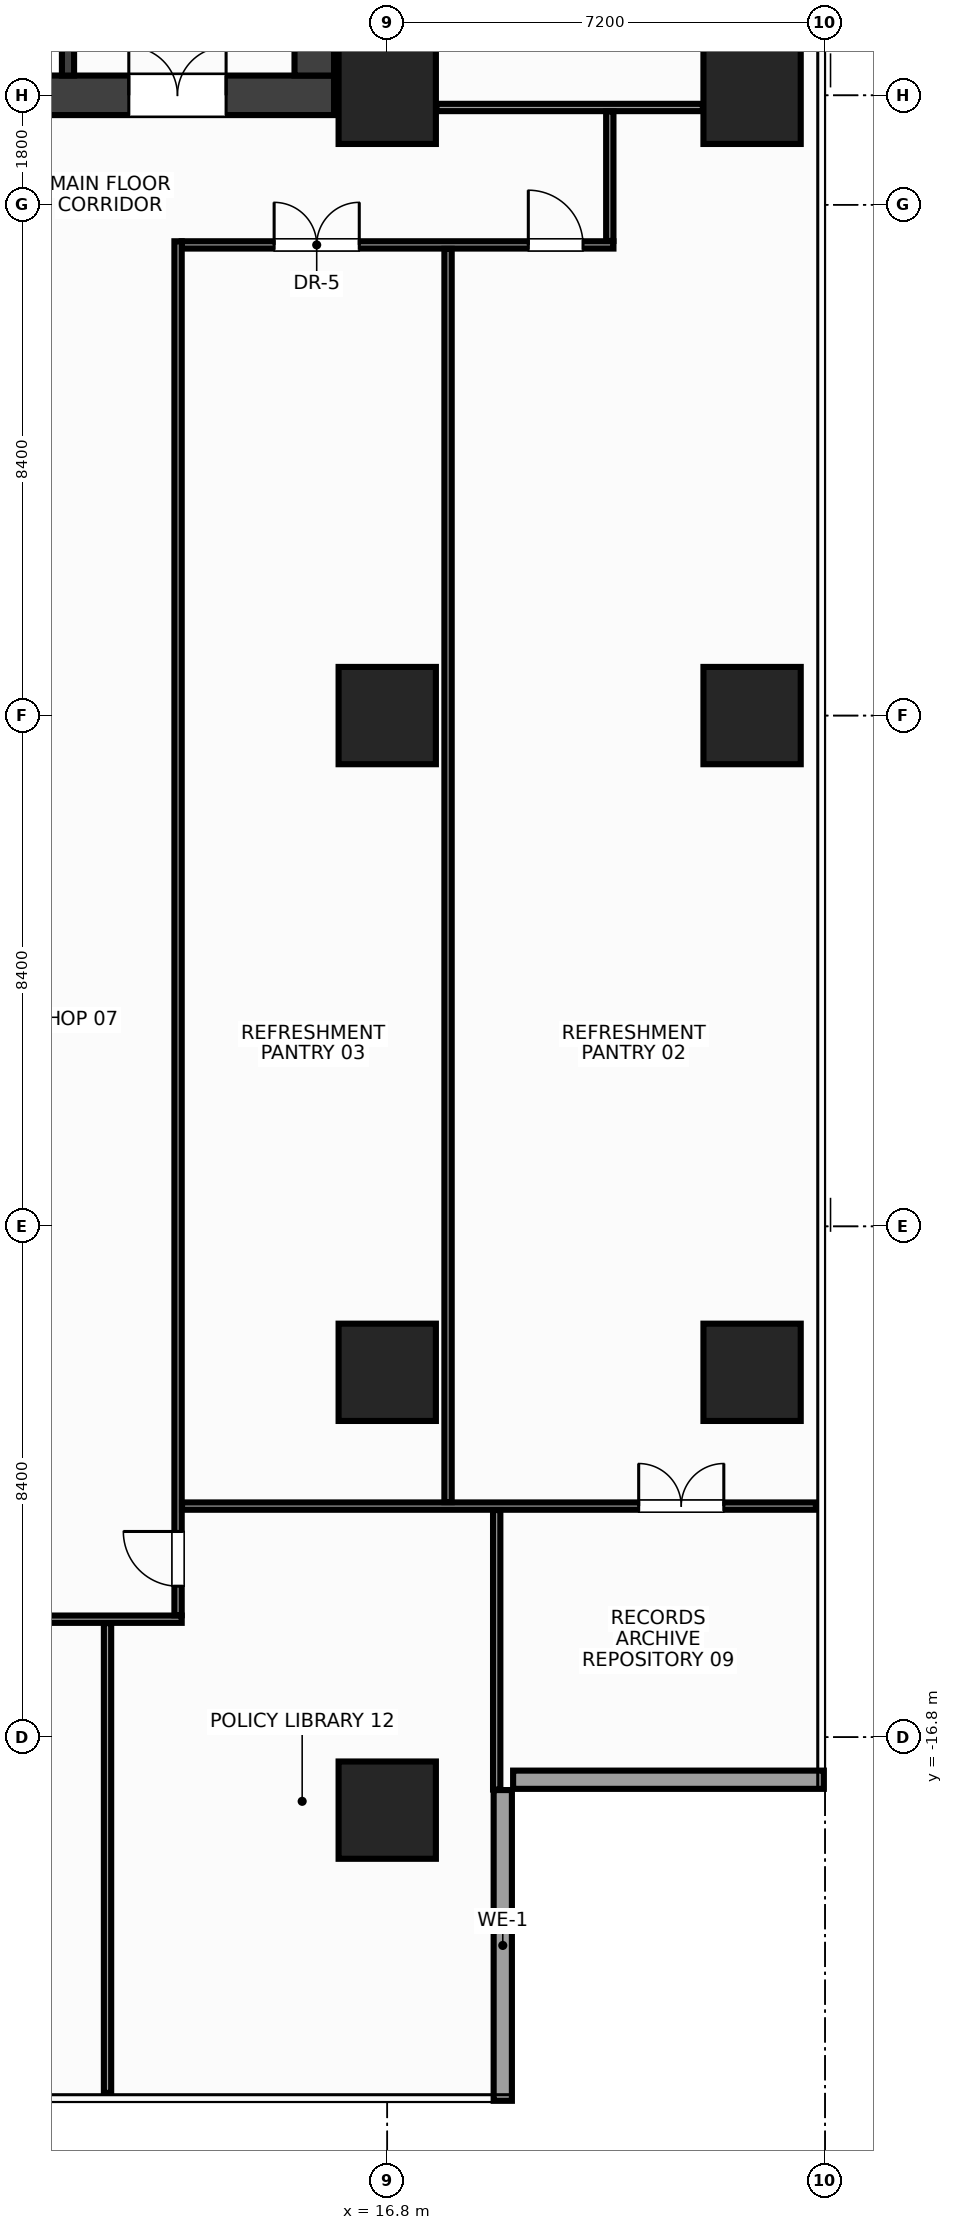
"""IFC4 building model, lengths in metres.
Left out: names, types, materials, properties, quantities, classifications, styles, units other than length and angle.
Written with IfcOpenShell. Run it as: python <this file> out.ifc"""

import sys

from ifc_helpers import new_model, si_unit, direction, frame, frame_2d, origin, origin_2d, place, context, subcontext, project, spatial, rectangle, extrude, source, transform, mapped, element, fill, save


model = new_model("IFC4")
c1 = context("Model", 3, precision=1e-05, world=origin(), true_north=direction((0.0, 1.0)))
c2 = subcontext(c1, "Body", "Model", "MODEL_VIEW")
j1 = project(units=[si_unit("LENGTHUNIT", "METRE"), si_unit("PLANEANGLEUNIT", "RADIAN")], contexts=[c1])
p1 = place(None, origin())
s1 = spatial("IfcSite", under=j1, at=p1, CompositionType="ELEMENT")
p2 = place(p1, origin())
s2 = spatial("IfcBuilding", under=s1, at=p2, CompositionType="ELEMENT")
p3 = place(p2, frame((0.0, 0.0, 182.0)))
s3 = spatial("IfcBuildingStorey", under=s2, at=p3, CompositionType="ELEMENT", Elevation=182.0)
m1 = source(origin(), c2, "Body", "SweptSolid", [
    extrude(rectangle(XDim=31.85, YDim=0.65, at=frame_2d((15.925, 0.0))), origin(), (0.0, 0.0, 1.0), 3.6),
])
p4 = place(p3, frame((-15.925, 10.2, 0.0), z_axis=(0.0, 0.0, 1.0), x_axis=(1.0, 0.0, 0.0)))
e1 = element("IfcWall", 1, at=p4, inside=s3, PredefinedType="SHEAR", context=c2, shape_type="MappedRepresentation", body=[
    mapped(m1, transform((0.0, 0.0, 0.0), x_axis=(1.0, 0.0, 0.0), y_axis=(0.0, 1.0, 0.0), z_axis=(0.0, 0.0, 1.0), scale=1.0)),
])
p5 = place(p4, frame((1.775, 0.0, 0.0)))
e2 = element("IfcOpeningElement", 2, at=p5, cuts=e1, PredefinedType="OPENING", context=c2, shape_type="SweptSolid", body=[
    extrude(rectangle(XDim=1.6, YDim=2.15, at=frame_2d((0.8, 1.075))), frame((0.0, 0.337, 0.0), z_axis=(0.0, -1.0, 0.0), x_axis=(1.0, 0.0, 0.0)), (0.0, 0.0, 1.0), 0.674),
])
p6 = place(p4, frame((28.475, 0.0, 0.0)))
e3 = element("IfcOpeningElement", 3, at=p6, cuts=e1, PredefinedType="OPENING", context=c2, shape_type="SweptSolid", body=[
    extrude(rectangle(XDim=1.6, YDim=2.15, at=frame_2d((0.8, 1.075))), frame((0.0, 0.337, 0.0), z_axis=(0.0, -1.0, 0.0), x_axis=(1.0, 0.0, 0.0)), (0.0, 0.0, 1.0), 0.674),
])
p7 = place(p4, frame((15.175, 0.0, 0.0)))
e4 = element("IfcOpeningElement", 4, at=p7, cuts=e1, PredefinedType="OPENING", context=c2, shape_type="SweptSolid", body=[
    extrude(rectangle(XDim=1.5, YDim=2.2, at=frame_2d((0.75, 1.1))), frame((0.0, 0.337, 0.0), z_axis=(0.0, -1.0, 0.0), x_axis=(1.0, 0.0, 0.0)), (0.0, 0.0, 1.0), 0.674),
])
m2 = source(origin(), c2, "Body", "SweptSolid", [
    extrude(rectangle(XDim=12.95, YDim=0.65, at=frame_2d((6.475, 0.0))), origin(), (0.0, 0.0, 1.0), 3.6),
])
p8 = place(p3, frame((15.6, 10.525, 0.0), z_axis=(0.0, 0.0, 1.0), x_axis=(0.0, 1.0, 0.0)))
e5 = element("IfcWall", 5, at=p8, inside=s3, PredefinedType="SHEAR", context=c2, shape_type="MappedRepresentation", body=[
    mapped(m2, transform((0.0, 0.0, 0.0), x_axis=(1.0, 0.0, 0.0), y_axis=(0.0, 1.0, 0.0), z_axis=(0.0, 0.0, 1.0), scale=1.0)),
])
m3 = source(origin(), c2, "Body", "SweptSolid", [
    extrude(rectangle(XDim=3.125, YDim=0.2, at=frame_2d((1.562, 0.0))), origin(), (0.0, 0.0, 1.0), 3.6),
])
p9 = place(p3, frame((11.55, 10.525, 0.0), z_axis=(0.0, 0.0, 1.0), x_axis=(0.0, 1.0, 0.0)))
e6 = element("IfcWall", 6, at=p9, inside=s3, PredefinedType="SHEAR", context=c2, shape_type="MappedRepresentation", body=[
    mapped(m3, transform((0.0, 0.0, 0.0), x_axis=(1.0, 0.0, 0.0), y_axis=(0.0, 1.0, 0.0), z_axis=(0.0, 0.0, 1.0), scale=1.0)),
])
p10 = place(p9, frame((0.9, 0.0, 0.0)))
e7 = element("IfcOpeningElement", 7, at=p10, cuts=e6, PredefinedType="OPENING", context=c2, shape_type="SweptSolid", body=[
    extrude(rectangle(XDim=1.1, YDim=2.15, at=frame_2d((0.55, 1.075))), frame((0.0, 0.112, 0.0), z_axis=(0.0, -1.0, 0.0), x_axis=(1.0, 0.0, 0.0)), (0.0, 0.0, 1.0), 0.224),
])
m4 = source(origin(), c2, "Body", "SweptSolid", [
    extrude(rectangle(XDim=1.6, YDim=1.6, at=origin_2d()), origin(), (0.0, 0.0, 1.0), 3.6),
])
for number, where, z_axis, x_axis in (
    (8, (16.8, -18.0, 0.0), (0.0, 0.0, 1.0), (1.0, 0.0, 0.0)),
    (9, (16.8, -10.8, 0.0), (0.0, 0.0, 1.0), (1.0, 0.0, 0.0)),
    (10, (16.8, 0.0, 0.0), (0.0, 0.0, 1.0), (1.0, 0.0, 0.0)),
    (11, (16.8, 10.2, 0.0), (0.0, 0.0, 1.0), (1.0, 0.0, 0.0)),
    (12, (22.8, -10.8, 0.0), (0.0, 0.0, 1.0), (1.0, 0.0, 0.0)),
    (13, (22.8, 0.0, 0.0), (0.0, 0.0, 1.0), (1.0, 0.0, 0.0)),
    (14, (22.8, 10.2, 0.0), (0.0, 0.0, 1.0), (1.0, 0.0, 0.0)),
):
    element("IfcColumn", number, at=place(p3, frame(where, z_axis=z_axis, x_axis=x_axis)), inside=s3, PredefinedType="COLUMN", context=c2, shape_type="MappedRepresentation", body=[
        mapped(m4, transform((0.0, 0.0, 0.0), x_axis=(1.0, 0.0, 0.0), y_axis=(0.0, 1.0, 0.0), z_axis=(0.0, 0.0, 1.0), scale=1.0)),
    ])
m5 = source(origin(), c2, "Body", "SweptSolid", [
    extrude(rectangle(XDim=5.11, YDim=0.3, at=frame_2d((2.555, 0.0))), origin(), (0.0, 0.0, 1.0), 2.76),
])
p11 = place(p3, frame((18.7, -22.78, 0.0), z_axis=(0.0, 0.0, 1.0), x_axis=(0.0, 1.0, 0.0)))
e15 = element("IfcWall", 15, at=p11, inside=s3, PredefinedType="STANDARD", context=c2, shape_type="MappedRepresentation", body=[
    mapped(m5, transform((0.0, 0.0, 0.0), x_axis=(1.0, 0.0, 0.0), y_axis=(0.0, 1.0, 0.0), z_axis=(0.0, 0.0, 1.0), scale=1.0)),
])
m6 = source(origin(), c2, "Body", "SweptSolid", [
    extrude(rectangle(XDim=5.11, YDim=0.3, at=frame_2d((2.555, 0.0))), origin(), (0.0, 0.0, 1.0), 2.76),
])
p12 = place(p3, frame((18.87, -17.5, 0.0), z_axis=(0.0, 0.0, 1.0), x_axis=(1.0, 0.0, 0.0)))
e16 = element("IfcWall", 16, at=p12, inside=s3, PredefinedType="STANDARD", context=c2, shape_type="MappedRepresentation", body=[
    mapped(m6, transform((0.0, 0.0, 0.0), x_axis=(1.0, 0.0, 0.0), y_axis=(0.0, 1.0, 0.0), z_axis=(0.0, 0.0, 1.0), scale=1.0)),
])
m7 = source(origin(), c2, "Body", "SweptSolid", [
    extrude(rectangle(XDim=4.38, YDim=0.12, at=frame_2d((2.19, 0.0))), origin(), (0.0, 0.0, 1.0), 2.915),
])
p13 = place(p3, frame((17.61, 10.0, 0.0), z_axis=(0.0, 0.0, 1.0), x_axis=(1.0, 0.0, 0.0)))
e17 = element("IfcWall", 17, at=p13, inside=s3, PredefinedType="PARTITIONING", context=c2, shape_type="MappedRepresentation", body=[
    mapped(m7, transform((0.0, 0.0, 0.0), x_axis=(1.0, 0.0, 0.0), y_axis=(0.0, 1.0, 0.0), z_axis=(0.0, 0.0, 1.0), scale=1.0)),
])
m8 = source(origin(), c2, "Body", "SweptSolid", [
    extrude(rectangle(XDim=7.1, YDim=0.12, at=frame_2d((3.55, 0.0))), origin(), (0.0, 0.0, 1.0), 2.765),
])
p14 = place(p3, frame((13.42, 7.74, 0.0), z_axis=(0.0, 0.0, 1.0), x_axis=(1.0, 0.0, 0.0)))
e18 = element("IfcWall", 18, at=p14, inside=s3, PredefinedType="PARTITIONING", context=c2, shape_type="MappedRepresentation", body=[
    mapped(m8, transform((0.0, 0.0, 0.0), x_axis=(1.0, 0.0, 0.0), y_axis=(0.0, 1.0, 0.0), z_axis=(0.0, 0.0, 1.0), scale=1.0)),
])
p15 = place(p14, frame((5.7, 0.0, 0.0)))
e19 = element("IfcOpeningElement", 19, at=p15, cuts=e18, PredefinedType="OPENING", context=c2, shape_type="SweptSolid", body=[
    extrude(rectangle(XDim=0.9, YDim=2.15, at=frame_2d((0.45, 1.075))), frame((0.0, 0.072, 0.0), z_axis=(0.0, -1.0, 0.0), x_axis=(1.0, 0.0, 0.0)), (0.0, 0.0, 1.0), 0.144),
])
p16 = place(p14, frame((1.52, 0.0, 0.0)))
e20 = element("IfcOpeningElement", 20, at=p16, cuts=e18, PredefinedType="OPENING", context=c2, shape_type="SweptSolid", body=[
    extrude(rectangle(XDim=1.4, YDim=2.2, at=frame_2d((0.7, 1.1))), frame((0.0, 0.072, 0.0), z_axis=(0.0, -1.0, 0.0), x_axis=(1.0, 0.0, 0.0)), (0.0, 0.0, 1.0), 0.144),
])
m9 = source(origin(), c2, "Body", "SweptSolid", [
    extrude(rectangle(XDim=2.34, YDim=0.12, at=frame_2d((1.17, 0.0))), origin(), (0.0, 0.0, 1.0), 3.38),
])
p17 = place(p3, frame((11.08, -14.86, 0.0), z_axis=(0.0, 0.0, 1.0), x_axis=(1.0, 0.0, 0.0)))
e21 = element("IfcWall", 21, at=p17, inside=s3, PredefinedType="PARTITIONING", context=c2, shape_type="MappedRepresentation", body=[
    mapped(m9, transform((0.0, 0.0, 0.0), x_axis=(1.0, 0.0, 0.0), y_axis=(0.0, 1.0, 0.0), z_axis=(0.0, 0.0, 1.0), scale=1.0)),
])
m10 = source(origin(), c2, "Body", "SweptSolid", [
    extrude(rectangle(XDim=2.13, YDim=0.12, at=frame_2d((1.065, 0.0))), origin(), (0.0, 0.0, 1.0), 3.38),
])
p18 = place(p3, frame((20.46, 7.805, 0.0), z_axis=(0.0, 0.0, 1.0), x_axis=(0.0, 1.0, 0.0)))
e22 = element("IfcWall", 22, at=p18, inside=s3, PredefinedType="PARTITIONING", context=c2, shape_type="MappedRepresentation", body=[
    mapped(m10, transform((0.0, 0.0, 0.0), x_axis=(1.0, 0.0, 0.0), y_axis=(0.0, 1.0, 0.0), z_axis=(0.0, 0.0, 1.0), scale=1.0)),
])
m11 = source(origin(), c2, "Body", "SweptSolid", [
    extrude(rectangle(XDim=22.595, YDim=0.12, at=frame_2d((11.297, 0.0))), origin(), (0.0, 0.0, 1.0), 2.665),
])
p19 = place(p3, frame((13.36, -14.795, 0.0), z_axis=(0.0, 0.0, 1.0), x_axis=(0.0, 1.0, 0.0)))
e23 = element("IfcWall", 23, at=p19, inside=s3, PredefinedType="PARTITIONING", context=c2, shape_type="MappedRepresentation", body=[
    mapped(m11, transform((0.0, 0.0, 0.0), x_axis=(1.0, 0.0, 0.0), y_axis=(0.0, 1.0, 0.0), z_axis=(0.0, 0.0, 1.0), scale=1.0)),
])
p20 = place(p19, frame((0.478, 0.0, 0.0)))
e24 = element("IfcOpeningElement", 24, at=p20, cuts=e23, PredefinedType="OPENING", context=c2, shape_type="SweptSolid", body=[
    extrude(rectangle(XDim=0.9, YDim=2.15, at=frame_2d((0.45, 1.075))), frame((0.0, 0.072, 0.0), z_axis=(0.0, -1.0, 0.0), x_axis=(1.0, 0.0, 0.0)), (0.0, 0.0, 1.0), 0.144),
])
m12 = source(origin(), c2, "Body", "SweptSolid", [
    extrude(rectangle(XDim=10.425, YDim=0.12, at=frame_2d((5.212, 0.0))), origin(), (0.0, 0.0, 1.0), 2.965),
])
p21 = place(p3, frame((13.425, -13.0, 0.0), z_axis=(0.0, 0.0, 1.0), x_axis=(1.0, 0.0, 0.0)))
e25 = element("IfcWall", 25, at=p21, inside=s3, PredefinedType="PARTITIONING", context=c2, shape_type="MappedRepresentation", body=[
    mapped(m12, transform((0.0, 0.0, 0.0), x_axis=(1.0, 0.0, 0.0), y_axis=(0.0, 1.0, 0.0), z_axis=(0.0, 0.0, 1.0), scale=1.0)),
])
p22 = place(p21, frame((7.51, 0.0, 0.0)))
e26 = element("IfcOpeningElement", 26, at=p22, cuts=e25, PredefinedType="OPENING", context=c2, shape_type="SweptSolid", body=[
    extrude(rectangle(XDim=1.4, YDim=2.2, at=frame_2d((0.7, 1.1))), frame((0.0, 0.072, 0.0), z_axis=(0.0, -1.0, 0.0), x_axis=(1.0, 0.0, 0.0)), (0.0, 0.0, 1.0), 0.144),
])
m13 = source(origin(), c2, "Body", "SweptSolid", [
    extrude(rectangle(XDim=20.61, YDim=0.12, at=frame_2d((10.305, 0.0))), origin(), (0.0, 0.0, 1.0), 2.915),
])
p23 = place(p3, frame((17.8, -12.935, 0.0), z_axis=(0.0, 0.0, 1.0), x_axis=(0.0, 1.0, 0.0)))
e27 = element("IfcWall", 27, at=p23, inside=s3, PredefinedType="PARTITIONING", context=c2, shape_type="MappedRepresentation", body=[
    mapped(m13, transform((0.0, 0.0, 0.0), x_axis=(1.0, 0.0, 0.0), y_axis=(0.0, 1.0, 0.0), z_axis=(0.0, 0.0, 1.0), scale=1.0)),
])
m14 = source(origin(), c2, "Body", "SweptSolid", [
    extrude(rectangle(XDim=7.725, YDim=0.12, at=frame_2d((3.862, 0.0))), origin(), (0.0, 0.0, 1.0), 2.915),
])
p24 = place(p3, frame((12.2, -22.65, 0.0), z_axis=(0.0, 0.0, 1.0), x_axis=(0.0, 1.0, 0.0)))
e28 = element("IfcWall", 28, at=p24, inside=s3, PredefinedType="PARTITIONING", context=c2, shape_type="MappedRepresentation", body=[
    mapped(m14, transform((0.0, 0.0, 0.0), x_axis=(1.0, 0.0, 0.0), y_axis=(0.0, 1.0, 0.0), z_axis=(0.0, 0.0, 1.0), scale=1.0)),
])
m15 = source(origin(), c2, "Body", "SweptSolid", [
    extrude(rectangle(XDim=4.597, YDim=0.12, at=frame_2d((2.299, 0.0))), origin(), (0.0, 0.0, 1.0), 3.38),
])
p25 = place(p3, frame((18.6, -17.662, 0.0), z_axis=(0.0, 0.0, 1.0), x_axis=(0.0, 1.0, 0.0)))
e29 = element("IfcWall", 29, at=p25, inside=s3, PredefinedType="PARTITIONING", context=c2, shape_type="MappedRepresentation", body=[
    mapped(m15, transform((0.0, 0.0, 0.0), x_axis=(1.0, 0.0, 0.0), y_axis=(0.0, 1.0, 0.0), z_axis=(0.0, 0.0, 1.0), scale=1.0)),
])
m16 = source(origin(), c2, "Body", "SweptSolid", [
    extrude(rectangle(XDim=1.6, YDim=2.15, at=frame_2d((0.8, 1.075))), frame((0.0, 0.025, 0.0), z_axis=(0.0, -1.0, 0.0), x_axis=(1.0, 0.0, 0.0)), (0.0, 0.0, 1.0), 0.05),
])
p26 = place(p6, origin())
e30 = element("IfcDoor", 30, at=p26, inside=s3, OperationType="DOUBLE_DOOR_SINGLE_SWING", PredefinedType="DOOR", context=c2, shape_type="MappedRepresentation", body=[
    mapped(m16, transform((0.0, 0.0, 0.0), x_axis=(1.0, 0.0, 0.0), y_axis=(0.0, 1.0, 0.0), z_axis=(0.0, 0.0, 1.0), scale=1.0)),
])
fill(e3, e30)
m17 = source(origin(), c2, "Body", "SweptSolid", [
    extrude(rectangle(XDim=0.9, YDim=2.15, at=frame_2d((0.45, 1.075))), frame((0.0, 0.025, 0.0), z_axis=(0.0, -1.0, 0.0), x_axis=(1.0, 0.0, 0.0)), (0.0, 0.0, 1.0), 0.05),
])
p27 = place(p15, origin())
e31 = element("IfcDoor", 31, at=p27, inside=s3, OperationType="SINGLE_SWING_LEFT", PredefinedType="DOOR", context=c2, shape_type="MappedRepresentation", body=[
    mapped(m17, transform((0.0, 0.0, 0.0), x_axis=(1.0, 0.0, 0.0), y_axis=(0.0, 1.0, 0.0), z_axis=(0.0, 0.0, 1.0), scale=1.0)),
])
fill(e19, e31)
m18 = source(origin(), c2, "Body", "SweptSolid", [
    extrude(rectangle(XDim=1.4, YDim=2.2, at=frame_2d((0.7, 1.1))), frame((0.0, 0.025, 0.0), z_axis=(0.0, -1.0, 0.0), x_axis=(1.0, 0.0, 0.0)), (0.0, 0.0, 1.0), 0.05),
])
p28 = place(p16, origin())
e32 = element("IfcDoor", 32, at=p28, inside=s3, OperationType="DOUBLE_DOOR_SINGLE_SWING", PredefinedType="DOOR", context=c2, shape_type="MappedRepresentation", body=[
    mapped(m18, transform((0.0, 0.0, 0.0), x_axis=(1.0, 0.0, 0.0), y_axis=(0.0, 1.0, 0.0), z_axis=(0.0, 0.0, 1.0), scale=1.0)),
])
fill(e20, e32)
p29 = place(p20, origin())
e33 = element("IfcDoor", 33, at=p29, inside=s3, OperationType="SINGLE_SWING_RIGHT", PredefinedType="DOOR", context=c2, shape_type="MappedRepresentation", body=[
    mapped(m17, transform((0.0, 0.0, 0.0), x_axis=(1.0, 0.0, 0.0), y_axis=(0.0, 1.0, 0.0), z_axis=(0.0, 0.0, 1.0), scale=1.0)),
])
fill(e24, e33)
p30 = place(p22, origin())
e34 = element("IfcDoor", 34, at=p30, inside=s3, OperationType="DOUBLE_DOOR_SINGLE_SWING", PredefinedType="DOOR", context=c2, shape_type="MappedRepresentation", body=[
    mapped(m18, transform((0.0, 0.0, 0.0), x_axis=(1.0, 0.0, 0.0), y_axis=(0.0, 1.0, 0.0), z_axis=(0.0, 0.0, 1.0), scale=1.0)),
])
fill(e26, e34)
save(model, sys.argv[1])
